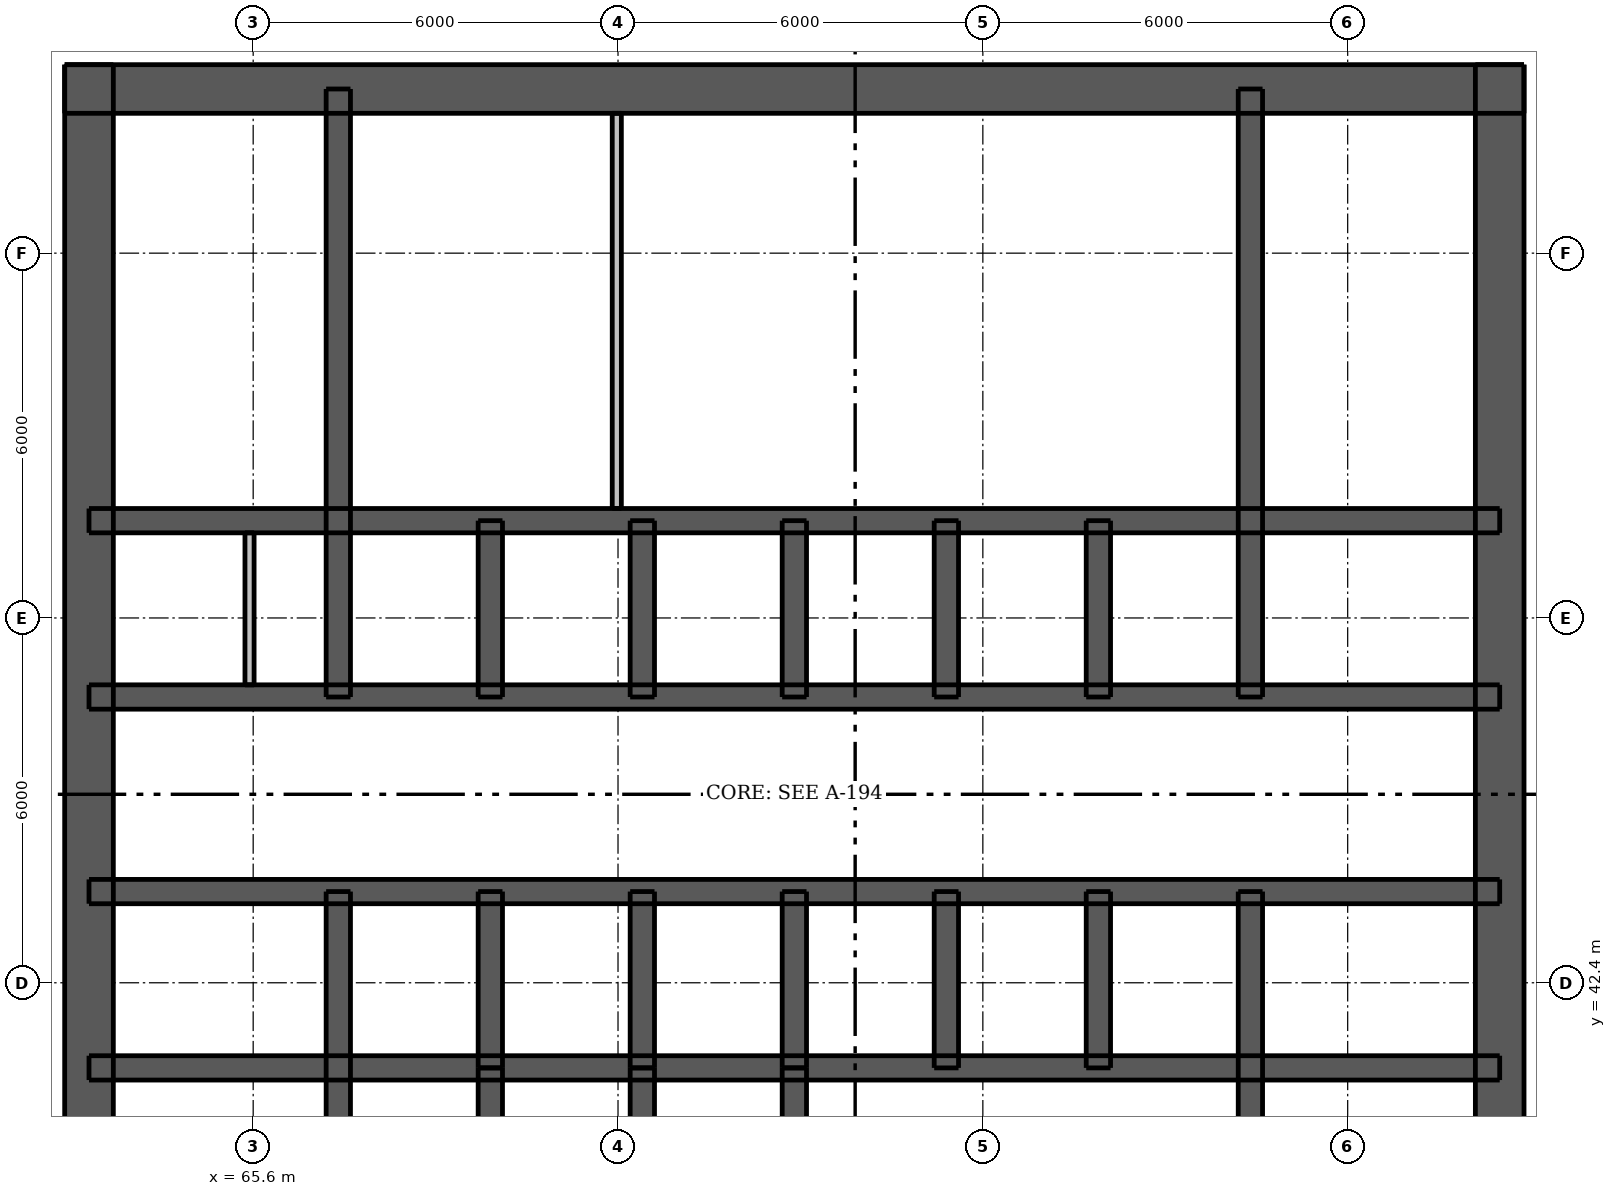
"""IFC4 building model, lengths in metres.
Left out: names, types, materials, properties, quantities, classifications, styles, units other than length and angle.
Written with IfcOpenShell. Run it as: python <this file> out.ifc"""

import sys

from ifc_helpers import new_model, si_unit, direction, frame, frame_2d, origin, place, context, subcontext, project, spatial, rectangle, extrude, element, fill, save


model = new_model("IFC4")
c1 = context("Model", 3, precision=1e-05, world=origin(), true_north=direction((0.0, 1.0)))
c2 = subcontext(c1, "Body", "Model", "MODEL_VIEW")
j1 = project(units=[si_unit("LENGTHUNIT", "METRE"), si_unit("PLANEANGLEUNIT", "RADIAN")], contexts=[c1])
p1 = place(None, origin())
s1 = spatial("IfcSite", under=j1, at=p1, CompositionType="ELEMENT")
p2 = place(p1, origin())
s2 = spatial("IfcBuilding", under=s1, at=p2, CompositionType="ELEMENT")
p3 = place(p2, frame((0.0, 0.0, 98.5)))
s3 = spatial("IfcBuildingStorey", under=s2, at=p3, CompositionType="ELEMENT", Elevation=98.5)
p4 = place(p3, frame((62.5, 57.1, 0.0), z_axis=(0.0, 0.0, 1.0), x_axis=(1.0, 0.0, 0.0)))
e1 = element("IfcWall", 1, at=p4, inside=s3, PredefinedType="SHEAR", context=c2, shape_type="SweptSolid", body=[
    extrude(rectangle(XDim=24.0, YDim=0.8, at=frame_2d((12.0, 0.0))), origin(), (0.0, 0.0, 1.0), 3.05),
])
p5 = place(p4, frame((20.9, 0.0, 0.0)))
e2 = element("IfcOpeningElement", 2, at=p5, cuts=e1, PredefinedType="OPENING", context=c2, shape_type="SweptSolid", body=[
    extrude(rectangle(XDim=1.1, YDim=2.1, at=frame_2d((0.55, 1.05))), frame((0.0, 0.41, 0.0), z_axis=(0.0, -1.0, 0.0), x_axis=(1.0, 0.0, 0.0)), (0.0, 0.0, 1.0), 0.82),
])
p6 = place(p4, frame((2.0, 0.0, 0.0)))
e3 = element("IfcOpeningElement", 3, at=p6, cuts=e1, PredefinedType="OPENING", context=c2, shape_type="SweptSolid", body=[
    extrude(rectangle(XDim=1.1, YDim=2.1, at=frame_2d((0.55, 1.05))), frame((0.0, 0.41, 0.0), z_axis=(0.0, -1.0, 0.0), x_axis=(1.0, 0.0, 0.0)), (0.0, 0.0, 1.0), 0.82),
])
p7 = place(p4, frame((6.44, 0.0, 0.0)))
e4 = element("IfcOpeningElement", 4, at=p7, cuts=e1, PredefinedType="OPENING", context=c2, shape_type="SweptSolid", body=[
    extrude(rectangle(XDim=0.9, YDim=2.1, at=frame_2d((0.45, 1.05))), frame((0.0, 0.41, 0.0), z_axis=(0.0, -1.0, 0.0), x_axis=(1.0, 0.0, 0.0)), (0.0, 0.0, 1.0), 0.82),
])
p8 = place(p4, frame((13.74, 0.0, 0.0)))
e5 = element("IfcOpeningElement", 5, at=p8, cuts=e1, PredefinedType="OPENING", context=c2, shape_type="SweptSolid", body=[
    extrude(rectangle(XDim=0.9, YDim=2.1, at=frame_2d((0.45, 1.05))), frame((0.0, 0.41, 0.0), z_axis=(0.0, -1.0, 0.0), x_axis=(1.0, 0.0, 0.0)), (0.0, 0.0, 1.0), 0.82),
])
p9 = place(p3, frame((62.9, 33.5, 0.0), z_axis=(0.0, 0.0, 1.0), x_axis=(0.0, 1.0, 0.0)))
e6 = element("IfcWall", 6, at=p9, inside=s3, PredefinedType="SHEAR", context=c2, shape_type="SweptSolid", body=[
    extrude(rectangle(XDim=24.0, YDim=0.8, at=frame_2d((12.0, 0.0))), origin(), (0.0, 0.0, 1.0), 3.05),
])
p10 = place(p9, frame((11.2, 0.0, 0.0)))
e7 = element("IfcOpeningElement", 7, at=p10, cuts=e6, PredefinedType="OPENING", context=c2, shape_type="SweptSolid", body=[
    extrude(rectangle(XDim=1.6, YDim=2.1, at=frame_2d((0.8, 1.05))), frame((0.0, 0.41, 0.0), z_axis=(0.0, -1.0, 0.0), x_axis=(1.0, 0.0, 0.0)), (0.0, 0.0, 1.0), 0.82),
])
p11 = place(p3, frame((86.1, 33.5, 0.0), z_axis=(0.0, 0.0, 1.0), x_axis=(0.0, 1.0, 0.0)))
e8 = element("IfcWall", 8, at=p11, inside=s3, PredefinedType="SHEAR", context=c2, shape_type="SweptSolid", body=[
    extrude(rectangle(XDim=24.0, YDim=0.8, at=frame_2d((12.0, 0.0))), origin(), (0.0, 0.0, 1.0), 3.05),
])
p12 = place(p11, frame((11.2, 0.0, 0.0)))
e9 = element("IfcOpeningElement", 9, at=p12, cuts=e8, PredefinedType="OPENING", context=c2, shape_type="SweptSolid", body=[
    extrude(rectangle(XDim=1.6, YDim=2.1, at=frame_2d((0.8, 1.05))), frame((0.0, 0.41, 0.0), z_axis=(0.0, -1.0, 0.0), x_axis=(1.0, 0.0, 0.0)), (0.0, 0.0, 1.0), 0.82),
])
p13 = place(p3, frame((62.9, 41.0, 0.0), z_axis=(0.0, 0.0, 1.0), x_axis=(1.0, 0.0, 0.0)))
e10 = element("IfcWall", 10, at=p13, inside=s3, PredefinedType="SHEAR", context=c2, shape_type="SweptSolid", body=[
    extrude(rectangle(XDim=23.2, YDim=0.4, at=frame_2d((11.6, 0.0))), origin(), (0.0, 0.0, 1.0), 3.05),
])
p14 = place(p3, frame((62.9, 43.9, 0.0), z_axis=(0.0, 0.0, 1.0), x_axis=(1.0, 0.0, 0.0)))
e11 = element("IfcWall", 11, at=p14, inside=s3, PredefinedType="SHEAR", context=c2, shape_type="SweptSolid", body=[
    extrude(rectangle(XDim=23.2, YDim=0.4, at=frame_2d((11.6, 0.0))), origin(), (0.0, 0.0, 1.0), 3.05),
])
p15 = place(p14, frame((1.7, 0.0, 0.0)))
e12 = element("IfcOpeningElement", 12, at=p15, cuts=e11, PredefinedType="OPENING", context=c2, shape_type="SweptSolid", body=[
    extrude(rectangle(XDim=0.9, YDim=2.1, at=frame_2d((0.45, 1.05))), frame((0.0, 0.21, 0.0), z_axis=(0.0, -1.0, 0.0), x_axis=(1.0, 0.0, 0.0)), (0.0, 0.0, 1.0), 0.42),
])
p16 = place(p14, frame((20.6, 0.0, 0.0)))
e13 = element("IfcOpeningElement", 13, at=p16, cuts=e11, PredefinedType="OPENING", context=c2, shape_type="SweptSolid", body=[
    extrude(rectangle(XDim=0.9, YDim=2.1, at=frame_2d((0.45, 1.05))), frame((0.0, 0.21, 0.0), z_axis=(0.0, -1.0, 0.0), x_axis=(1.0, 0.0, 0.0)), (0.0, 0.0, 1.0), 0.42),
])
p17 = place(p14, frame((4.8, 0.0, 0.0)))
e14 = element("IfcOpeningElement", 14, at=p17, cuts=e11, PredefinedType="OPENING", context=c2, shape_type="SweptSolid", body=[
    extrude(rectangle(XDim=1.1, YDim=2.1, at=frame_2d((0.55, 1.05))), frame((0.0, 0.21, 0.0), z_axis=(0.0, -1.0, 0.0), x_axis=(1.0, 0.0, 0.0)), (0.0, 0.0, 1.0), 0.42),
])
p18 = place(p14, frame((7.3, 0.0, 0.0)))
e15 = element("IfcOpeningElement", 15, at=p18, cuts=e11, PredefinedType="OPENING", context=c2, shape_type="SweptSolid", body=[
    extrude(rectangle(XDim=1.1, YDim=2.1, at=frame_2d((0.55, 1.05))), frame((0.0, 0.21, 0.0), z_axis=(0.0, -1.0, 0.0), x_axis=(1.0, 0.0, 0.0)), (0.0, 0.0, 1.0), 0.42),
])
p19 = place(p14, frame((9.8, 0.0, 0.0)))
e16 = element("IfcOpeningElement", 16, at=p19, cuts=e11, PredefinedType="OPENING", context=c2, shape_type="SweptSolid", body=[
    extrude(rectangle(XDim=1.1, YDim=2.1, at=frame_2d((0.55, 1.05))), frame((0.0, 0.21, 0.0), z_axis=(0.0, -1.0, 0.0), x_axis=(1.0, 0.0, 0.0)), (0.0, 0.0, 1.0), 0.42),
])
p20 = place(p14, frame((12.3, 0.0, 0.0)))
e17 = element("IfcOpeningElement", 17, at=p20, cuts=e11, PredefinedType="OPENING", context=c2, shape_type="SweptSolid", body=[
    extrude(rectangle(XDim=1.1, YDim=2.1, at=frame_2d((0.55, 1.05))), frame((0.0, 0.21, 0.0), z_axis=(0.0, -1.0, 0.0), x_axis=(1.0, 0.0, 0.0)), (0.0, 0.0, 1.0), 0.42),
])
p21 = place(p14, frame((14.8, 0.0, 0.0)))
e18 = element("IfcOpeningElement", 18, at=p21, cuts=e11, PredefinedType="OPENING", context=c2, shape_type="SweptSolid", body=[
    extrude(rectangle(XDim=1.1, YDim=2.1, at=frame_2d((0.55, 1.05))), frame((0.0, 0.21, 0.0), z_axis=(0.0, -1.0, 0.0), x_axis=(1.0, 0.0, 0.0)), (0.0, 0.0, 1.0), 0.42),
])
p22 = place(p14, frame((17.3, 0.0, 0.0)))
e19 = element("IfcOpeningElement", 19, at=p22, cuts=e11, PredefinedType="OPENING", context=c2, shape_type="SweptSolid", body=[
    extrude(rectangle(XDim=1.1, YDim=2.1, at=frame_2d((0.55, 1.05))), frame((0.0, 0.21, 0.0), z_axis=(0.0, -1.0, 0.0), x_axis=(1.0, 0.0, 0.0)), (0.0, 0.0, 1.0), 0.42),
])
p23 = place(p3, frame((62.9, 47.1, 0.0), z_axis=(0.0, 0.0, 1.0), x_axis=(1.0, 0.0, 0.0)))
e20 = element("IfcWall", 20, at=p23, inside=s3, PredefinedType="SHEAR", context=c2, shape_type="SweptSolid", body=[
    extrude(rectangle(XDim=23.2, YDim=0.4, at=frame_2d((11.6, 0.0))), origin(), (0.0, 0.0, 1.0), 3.05),
])
p24 = place(p23, frame((1.07, 0.0, 0.0)))
e21 = element("IfcOpeningElement", 21, at=p24, cuts=e20, PredefinedType="OPENING", context=c2, shape_type="SweptSolid", body=[
    extrude(rectangle(XDim=0.9, YDim=2.1, at=frame_2d((0.45, 1.05))), frame((0.0, 0.21, 0.0), z_axis=(0.0, -1.0, 0.0), x_axis=(1.0, 0.0, 0.0)), (0.0, 0.0, 1.0), 0.42),
])
p25 = place(p23, frame((2.87, 0.0, 0.0)))
e22 = element("IfcOpeningElement", 22, at=p25, cuts=e20, PredefinedType="OPENING", context=c2, shape_type="SweptSolid", body=[
    extrude(rectangle(XDim=0.8, YDim=2.1, at=frame_2d((0.4, 1.05))), frame((0.0, 0.21, 0.0), z_axis=(0.0, -1.0, 0.0), x_axis=(1.0, 0.0, 0.0)), (0.0, 0.0, 1.0), 0.42),
])
p26 = place(p23, frame((20.6, 0.0, 0.0)))
e23 = element("IfcOpeningElement", 23, at=p26, cuts=e20, PredefinedType="OPENING", context=c2, shape_type="SweptSolid", body=[
    extrude(rectangle(XDim=0.9, YDim=2.1, at=frame_2d((0.45, 1.05))), frame((0.0, 0.21, 0.0), z_axis=(0.0, -1.0, 0.0), x_axis=(1.0, 0.0, 0.0)), (0.0, 0.0, 1.0), 0.42),
])
p27 = place(p3, frame((62.9, 50.0, 0.0), z_axis=(0.0, 0.0, 1.0), x_axis=(1.0, 0.0, 0.0)))
e24 = element("IfcWall", 24, at=p27, inside=s3, PredefinedType="SHEAR", context=c2, shape_type="SweptSolid", body=[
    extrude(rectangle(XDim=23.2, YDim=0.4, at=frame_2d((11.6, 0.0))), origin(), (0.0, 0.0, 1.0), 3.05),
])
p28 = place(p3, frame((67.0, 33.9, 0.0), z_axis=(0.0, 0.0, 1.0), x_axis=(0.0, 1.0, 0.0)))
e25 = element("IfcWall", 25, at=p28, inside=s3, PredefinedType="SHEAR", context=c2, shape_type="SweptSolid", body=[
    extrude(rectangle(XDim=10.0, YDim=0.4, at=frame_2d((5.0, 0.0))), origin(), (0.0, 0.0, 1.0), 3.05),
])
p29 = place(p28, frame((0.6, 0.0, 0.0)))
e26 = element("IfcOpeningElement", 26, at=p29, cuts=e25, PredefinedType="OPENING", context=c2, shape_type="SweptSolid", body=[
    extrude(rectangle(XDim=1.1, YDim=2.1, at=frame_2d((0.55, 1.05))), frame((0.0, 0.21, 0.0), z_axis=(0.0, -1.0, 0.0), x_axis=(1.0, 0.0, 0.0)), (0.0, 0.0, 1.0), 0.42),
])
for number, where, z_axis, x_axis in (
    (27, (67.0, 47.1, 0.0), (0.0, 0.0, 1.0), (0.0, 1.0, 0.0)),
    (28, (82.0, 33.9, 0.0), (0.0, 0.0, 1.0), (0.0, 1.0, 0.0)),
    (29, (82.0, 47.1, 0.0), (0.0, 0.0, 1.0), (0.0, 1.0, 0.0)),
):
    element("IfcWall", number, at=place(p3, frame(where, z_axis=z_axis, x_axis=x_axis)), inside=s3, PredefinedType="SHEAR", context=c2, shape_type="SweptSolid", body=[
        extrude(rectangle(XDim=10.0, YDim=0.4, at=frame_2d((5.0, 0.0))), origin(), (0.0, 0.0, 1.0), 3.05),
    ])
for number, where, z_axis, x_axis in (
    (30, (69.5, 41.0, 0.0), (0.0, 0.0, 1.0), (0.0, 1.0, 0.0)),
    (31, (69.5, 47.1, 0.0), (0.0, 0.0, 1.0), (0.0, 1.0, 0.0)),
    (32, (72.0, 41.0, 0.0), (0.0, 0.0, 1.0), (0.0, 1.0, 0.0)),
    (33, (72.0, 47.1, 0.0), (0.0, 0.0, 1.0), (0.0, 1.0, 0.0)),
    (34, (74.5, 41.0, 0.0), (0.0, 0.0, 1.0), (0.0, 1.0, 0.0)),
    (35, (74.5, 47.1, 0.0), (0.0, 0.0, 1.0), (0.0, 1.0, 0.0)),
    (36, (77.0, 41.0, 0.0), (0.0, 0.0, 1.0), (0.0, 1.0, 0.0)),
    (37, (77.0, 47.1, 0.0), (0.0, 0.0, 1.0), (0.0, 1.0, 0.0)),
    (38, (79.5, 41.0, 0.0), (0.0, 0.0, 1.0), (0.0, 1.0, 0.0)),
    (39, (79.5, 47.1, 0.0), (0.0, 0.0, 1.0), (0.0, 1.0, 0.0)),
    (40, (69.5, 38.1, 0.0), (0.0, 0.0, 1.0), (0.0, 1.0, 0.0)),
    (41, (72.0, 38.1, 0.0), (0.0, 0.0, 1.0), (0.0, 1.0, 0.0)),
    (42, (74.5, 38.1, 0.0), (0.0, 0.0, 1.0), (0.0, 1.0, 0.0)),
):
    element("IfcWall", number, at=place(p3, frame(where, z_axis=z_axis, x_axis=x_axis)), inside=s3, PredefinedType="SHEAR", context=c2, shape_type="SweptSolid", body=[
        extrude(rectangle(XDim=2.9, YDim=0.4, at=frame_2d((1.45, 0.0))), origin(), (0.0, 0.0, 1.0), 3.05),
    ])
p30 = place(p3, frame((65.54, 47.3, 0.0), z_axis=(0.0, 0.0, 1.0), x_axis=(0.0, 1.0, 0.0)))
e43 = element("IfcWall", 43, at=p30, inside=s3, PredefinedType="PLUMBINGWALL", context=c2, shape_type="SweptSolid", body=[
    extrude(rectangle(XDim=2.5, YDim=0.15, at=frame_2d((1.25, 0.0))), origin(), (0.0, 0.0, 1.0), 3.05),
])
p31 = place(p3, frame((71.58, 50.2, 0.0), z_axis=(0.0, 0.0, 1.0), x_axis=(0.0, 1.0, 0.0)))
e44 = element("IfcWall", 44, at=p31, inside=s3, PredefinedType="PLUMBINGWALL", context=c2, shape_type="SweptSolid", body=[
    extrude(rectangle(XDim=6.5, YDim=0.15, at=frame_2d((3.25, 0.0))), origin(), (0.0, 0.0, 1.0), 3.05),
])
p32 = place(p5, origin())
e45 = element("IfcDoor", 45, at=p32, inside=s3, OperationType="SINGLE_SWING_RIGHT", PredefinedType="DOOR", context=c2, shape_type="SweptSolid", body=[
    extrude(rectangle(XDim=1.1, YDim=2.1, at=frame_2d((0.55, 1.05))), frame((0.0, -0.337, 0.0), z_axis=(0.0, -1.0, 0.0), x_axis=(1.0, 0.0, 0.0)), (0.0, 0.0, 1.0), 0.05),
])
fill(e2, e45)
p33 = place(p6, origin())
e46 = element("IfcDoor", 46, at=p33, inside=s3, OperationType="SINGLE_SWING_LEFT", PredefinedType="DOOR", context=c2, shape_type="SweptSolid", body=[
    extrude(rectangle(XDim=1.1, YDim=2.1, at=frame_2d((0.55, 1.05))), frame((0.0, -0.337, 0.0), z_axis=(0.0, -1.0, 0.0), x_axis=(1.0, 0.0, 0.0)), (0.0, 0.0, 1.0), 0.05),
])
fill(e3, e46)
p34 = place(p10, origin())
e47 = element("IfcDoor", 47, at=p34, inside=s3, OperationType="DOUBLE_DOOR_SINGLE_SWING", PredefinedType="DOOR", context=c2, shape_type="SweptSolid", body=[
    extrude(rectangle(XDim=1.6, YDim=2.1, at=frame_2d((0.8, 1.05))), frame((0.0, -0.337, 0.0), z_axis=(0.0, -1.0, 0.0), x_axis=(1.0, 0.0, 0.0)), (0.0, 0.0, 1.0), 0.05),
])
fill(e7, e47)
p35 = place(p12, origin())
e48 = element("IfcDoor", 48, at=p35, inside=s3, OperationType="DOUBLE_DOOR_SINGLE_SWING", PredefinedType="DOOR", context=c2, shape_type="SweptSolid", body=[
    extrude(rectangle(XDim=1.6, YDim=2.1, at=frame_2d((0.8, 1.05))), frame((0.0, 0.388, 0.0), z_axis=(0.0, -1.0, 0.0), x_axis=(1.0, 0.0, 0.0)), (0.0, 0.0, 1.0), 0.05),
])
fill(e9, e48)
p36 = place(p15, origin())
e49 = element("IfcDoor", 49, at=p36, inside=s3, OperationType="SINGLE_SWING_LEFT", PredefinedType="DOOR", context=c2, shape_type="SweptSolid", body=[
    extrude(rectangle(XDim=0.9, YDim=2.1, at=frame_2d((0.45, 1.05))), frame((0.0, -0.138, 0.0), z_axis=(0.0, -1.0, 0.0), x_axis=(1.0, 0.0, 0.0)), (0.0, 0.0, 1.0), 0.05),
])
fill(e12, e49)
p37 = place(p16, origin())
e50 = element("IfcDoor", 50, at=p37, inside=s3, OperationType="SINGLE_SWING_LEFT", PredefinedType="DOOR", context=c2, shape_type="SweptSolid", body=[
    extrude(rectangle(XDim=0.9, YDim=2.1, at=frame_2d((0.45, 1.05))), frame((0.0, -0.138, 0.0), z_axis=(0.0, -1.0, 0.0), x_axis=(1.0, 0.0, 0.0)), (0.0, 0.0, 1.0), 0.05),
])
fill(e13, e50)
p38 = place(p24, origin())
e51 = element("IfcDoor", 51, at=p38, inside=s3, OperationType="SINGLE_SWING_LEFT", PredefinedType="DOOR", context=c2, shape_type="SweptSolid", body=[
    extrude(rectangle(XDim=0.9, YDim=2.1, at=frame_2d((0.45, 1.05))), frame((0.0, 0.188, 0.0), z_axis=(0.0, -1.0, 0.0), x_axis=(1.0, 0.0, 0.0)), (0.0, 0.0, 1.0), 0.05),
])
fill(e21, e51)
p39 = place(p25, origin())
e52 = element("IfcDoor", 52, at=p39, inside=s3, OperationType="SINGLE_SWING_RIGHT", PredefinedType="DOOR", context=c2, shape_type="SweptSolid", body=[
    extrude(rectangle(XDim=0.8, YDim=2.1, at=frame_2d((0.4, 1.05))), frame((0.0, 0.188, 0.0), z_axis=(0.0, -1.0, 0.0), x_axis=(1.0, 0.0, 0.0)), (0.0, 0.0, 1.0), 0.05),
])
fill(e22, e52)
p40 = place(p26, origin())
e53 = element("IfcDoor", 53, at=p40, inside=s3, OperationType="SINGLE_SWING_LEFT", PredefinedType="DOOR", context=c2, shape_type="SweptSolid", body=[
    extrude(rectangle(XDim=0.9, YDim=2.1, at=frame_2d((0.45, 1.05))), frame((0.0, 0.188, 0.0), z_axis=(0.0, -1.0, 0.0), x_axis=(1.0, 0.0, 0.0)), (0.0, 0.0, 1.0), 0.05),
])
fill(e23, e53)
p41 = place(p7, origin())
e54 = element("IfcDoor", 54, at=p41, inside=s3, OperationType="SINGLE_SWING_RIGHT", PredefinedType="DOOR", context=c2, shape_type="SweptSolid", body=[
    extrude(rectangle(XDim=0.9, YDim=2.1, at=frame_2d((0.45, 1.05))), frame((0.0, -0.337, 0.0), z_axis=(0.0, -1.0, 0.0), x_axis=(1.0, 0.0, 0.0)), (0.0, 0.0, 1.0), 0.05),
])
fill(e4, e54)
p42 = place(p8, origin())
e55 = element("IfcDoor", 55, at=p42, inside=s3, OperationType="SINGLE_SWING_RIGHT", PredefinedType="DOOR", context=c2, shape_type="SweptSolid", body=[
    extrude(rectangle(XDim=0.9, YDim=2.1, at=frame_2d((0.45, 1.05))), frame((0.0, -0.337, 0.0), z_axis=(0.0, -1.0, 0.0), x_axis=(1.0, 0.0, 0.0)), (0.0, 0.0, 1.0), 0.05),
])
fill(e5, e55)
p43 = place(p17, origin())
e56 = element("IfcDoor", 56, at=p43, inside=s3, OperationType="DOUBLE_DOOR_SLIDING", PredefinedType="DOOR", context=c2, shape_type="SweptSolid", body=[
    extrude(rectangle(XDim=1.1, YDim=2.1, at=frame_2d((0.55, 1.05))), frame((0.0, 0.025, 0.0), z_axis=(0.0, -1.0, 0.0), x_axis=(1.0, 0.0, 0.0)), (0.0, 0.0, 1.0), 0.05),
])
fill(e14, e56)
p44 = place(p18, origin())
e57 = element("IfcDoor", 57, at=p44, inside=s3, OperationType="DOUBLE_DOOR_SLIDING", PredefinedType="DOOR", context=c2, shape_type="SweptSolid", body=[
    extrude(rectangle(XDim=1.1, YDim=2.1, at=frame_2d((0.55, 1.05))), frame((0.0, 0.025, 0.0), z_axis=(0.0, -1.0, 0.0), x_axis=(1.0, 0.0, 0.0)), (0.0, 0.0, 1.0), 0.05),
])
fill(e15, e57)
p45 = place(p19, origin())
e58 = element("IfcDoor", 58, at=p45, inside=s3, OperationType="DOUBLE_DOOR_SLIDING", PredefinedType="DOOR", context=c2, shape_type="SweptSolid", body=[
    extrude(rectangle(XDim=1.1, YDim=2.1, at=frame_2d((0.55, 1.05))), frame((0.0, 0.025, 0.0), z_axis=(0.0, -1.0, 0.0), x_axis=(1.0, 0.0, 0.0)), (0.0, 0.0, 1.0), 0.05),
])
fill(e16, e58)
p46 = place(p20, origin())
e59 = element("IfcDoor", 59, at=p46, inside=s3, OperationType="DOUBLE_DOOR_SLIDING", PredefinedType="DOOR", context=c2, shape_type="SweptSolid", body=[
    extrude(rectangle(XDim=1.1, YDim=2.1, at=frame_2d((0.55, 1.05))), frame((0.0, 0.025, 0.0), z_axis=(0.0, -1.0, 0.0), x_axis=(1.0, 0.0, 0.0)), (0.0, 0.0, 1.0), 0.05),
])
fill(e17, e59)
p47 = place(p21, origin())
e60 = element("IfcDoor", 60, at=p47, inside=s3, OperationType="DOUBLE_DOOR_SLIDING", PredefinedType="DOOR", context=c2, shape_type="SweptSolid", body=[
    extrude(rectangle(XDim=1.1, YDim=2.1, at=frame_2d((0.55, 1.05))), frame((0.0, 0.025, 0.0), z_axis=(0.0, -1.0, 0.0), x_axis=(1.0, 0.0, 0.0)), (0.0, 0.0, 1.0), 0.05),
])
fill(e18, e60)
p48 = place(p22, origin())
e61 = element("IfcDoor", 61, at=p48, inside=s3, OperationType="DOUBLE_DOOR_SLIDING", PredefinedType="DOOR", context=c2, shape_type="SweptSolid", body=[
    extrude(rectangle(XDim=1.1, YDim=2.1, at=frame_2d((0.55, 1.05))), frame((0.0, 0.025, 0.0), z_axis=(0.0, -1.0, 0.0), x_axis=(1.0, 0.0, 0.0)), (0.0, 0.0, 1.0), 0.05),
])
fill(e19, e61)
save(model, sys.argv[1])
